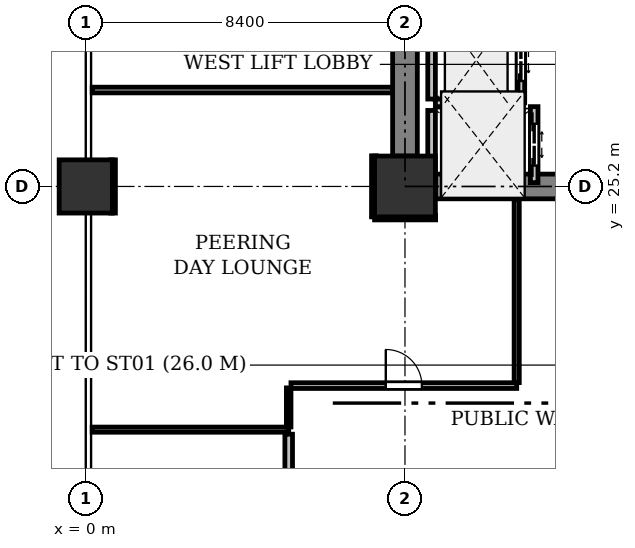
"""IFC4 building model, lengths in metres.
Left out: names, types, materials, properties, quantities, classifications, styles, units other than length and angle.
Written with IfcOpenShell. Run it as: python <this file> out.ifc"""

import sys

from ifc_helpers import new_model, si_unit, direction, frame, frame_2d, origin, origin_2d, place, context, subcontext, project, spatial, rectangle, extrude, element, fill, save


model = new_model("IFC4")
c1 = context("Model", 3, precision=1e-05, world=origin(), true_north=direction((0.0, 1.0)))
c2 = subcontext(c1, "Body", "Model", "MODEL_VIEW")
j1 = project(units=[si_unit("LENGTHUNIT", "METRE"), si_unit("PLANEANGLEUNIT", "RADIAN")], contexts=[c1])
p1 = place(None, origin())
s1 = spatial("IfcSite", under=j1, at=p1, CompositionType="ELEMENT")
p2 = place(p1, origin())
s2 = spatial("IfcBuilding", under=s1, at=p2, CompositionType="ELEMENT")
p3 = place(p2, frame((0.0, 0.0, 19.8)))
s3 = spatial("IfcBuildingStorey", under=s2, at=p3, CompositionType="ELEMENT", Elevation=19.8)
p4 = place(p3, frame((0.0, 25.2, 0.0), z_axis=(0.0, 0.0, 1.0), x_axis=(1.0, 0.0, 0.0)))
e1 = element("IfcColumn", 1, at=p4, inside=s3, PredefinedType="COLUMN", context=c2, shape_type="SweptSolid", body=[
    extrude(rectangle(XDim=1.4, YDim=1.4, at=origin_2d()), origin(), (0.0, 0.0, 1.0), 5.0),
])
p5 = place(p3, frame((8.4, 25.2, 0.0), z_axis=(0.0, 0.0, 1.0), x_axis=(1.0, 0.0, 0.0)))
e2 = element("IfcColumn", 2, at=p5, inside=s3, PredefinedType="COLUMN", context=c2, shape_type="SweptSolid", body=[
    extrude(rectangle(XDim=1.6, YDim=1.6, at=origin_2d()), origin(), (0.0, 0.0, 1.0), 5.0),
])
p6 = place(p3, frame((8.4, 26.0, 0.0), z_axis=(0.0, 0.0, 1.0), x_axis=(0.0, 1.0, 0.0)))
e3 = element("IfcWall", 3, at=p6, inside=s3, PredefinedType="SHEAR", context=c2, shape_type="SweptSolid", body=[
    extrude(rectangle(XDim=6.8, YDim=0.65, at=frame_2d((3.4, 0.0))), origin(), (0.0, 0.0, 1.0), 4.725),
])
p7 = place(p3, frame((9.2, 25.2, 0.0), z_axis=(0.0, 0.0, 1.0), x_axis=(1.0, 0.0, 0.0)))
e4 = element("IfcWall", 4, at=p7, inside=s3, PredefinedType="SHEAR", context=c2, shape_type="SweptSolid", body=[
    extrude(rectangle(XDim=6.8, YDim=0.65, at=frame_2d((3.4, 0.0))), origin(), (0.0, 0.0, 1.0), 4.725),
])
p8 = place(p7, frame((3.5, 0.0, 0.0)))
e5 = element("IfcOpeningElement", 5, at=p8, cuts=e4, PredefinedType="OPENING", context=c2, shape_type="SweptSolid", body=[
    extrude(rectangle(XDim=1.1, YDim=2.15, at=frame_2d((0.55, 1.075))), frame((0.0, 0.335, 0.0), z_axis=(0.0, -1.0, 0.0), x_axis=(1.0, 0.0, 0.0)), (0.0, 0.0, 1.0), 0.67),
])
p9 = place(p3, frame((11.45, 27.4, 0.0), z_axis=(0.0, 0.0, 1.0), x_axis=(0.0, 1.0, 0.0)))
e6 = element("IfcWall", 6, at=p9, inside=s3, PredefinedType="PARTITIONING", context=c2, shape_type="SweptSolid", body=[
    extrude(rectangle(XDim=2.25, YDim=0.2, at=frame_2d((1.125, 0.0))), origin(), (0.0, 0.0, 1.0), 4.725),
])
p10 = place(p9, frame((0.575, 0.0, 0.0)))
e7 = element("IfcOpeningElement", 7, at=p10, cuts=e6, PredefinedType="OPENING", context=c2, shape_type="SweptSolid", body=[
    extrude(rectangle(XDim=1.1, YDim=2.2, at=frame_2d((0.55, 1.1))), frame((0.0, 0.11, 0.0), z_axis=(0.0, -1.0, 0.0), x_axis=(1.0, 0.0, 0.0)), (0.0, 0.0, 1.0), 0.22),
])
p11 = place(p3, frame((9.1, 27.5, 0.0), z_axis=(0.0, 0.0, 1.0), x_axis=(0.0, 1.0, 0.0)))
e8 = element("IfcWall", 8, at=p11, inside=s3, PredefinedType="PARTITIONING", context=c2, shape_type="SweptSolid", body=[
    extrude(rectangle(XDim=2.05, YDim=0.2, at=frame_2d((1.025, 0.0))), origin(), (0.0, 0.0, 1.0), 4.725),
])
p12 = place(p3, frame((9.2, 27.4, 0.0), z_axis=(0.0, 0.0, 1.0), x_axis=(1.0, 0.0, 0.0)))
e9 = element("IfcWall", 9, at=p12, inside=s3, PredefinedType="PARTITIONING", context=c2, shape_type="SweptSolid", body=[
    extrude(rectangle(XDim=2.15, YDim=0.2, at=frame_2d((1.075, 0.0))), origin(), (0.0, 0.0, 1.0), 4.725),
])
p13 = place(p3, frame((11.8, 25.3, 0.0), z_axis=(0.0, 0.0, 1.0), x_axis=(0.0, 1.0, 0.0)))
e10 = element("IfcWall", 10, at=p13, inside=s3, PredefinedType="PARTITIONING", context=c2, shape_type="SweptSolid", body=[
    extrude(rectangle(XDim=2.0, YDim=0.2, at=frame_2d((1.0, 0.0))), origin(), (0.0, 0.0, 1.0), 4.725),
])
p14 = place(p13, frame((0.45, 0.0, 0.0)))
e11 = element("IfcOpeningElement", 11, at=p14, cuts=e10, PredefinedType="OPENING", context=c2, shape_type="SweptSolid", body=[
    extrude(rectangle(XDim=1.1, YDim=2.2, at=frame_2d((0.55, 1.1))), frame((0.0, 0.11, 0.0), z_axis=(0.0, -1.0, 0.0), x_axis=(1.0, 0.0, 0.0)), (0.0, 0.0, 1.0), 0.22),
])
p15 = place(p3, frame((9.1, 25.4, 0.0), z_axis=(0.0, 0.0, 1.0), x_axis=(0.0, 1.0, 0.0)))
e12 = element("IfcWall", 12, at=p15, inside=s3, PredefinedType="PARTITIONING", context=c2, shape_type="SweptSolid", body=[
    extrude(rectangle(XDim=1.8, YDim=0.2, at=frame_2d((0.9, 0.0))), origin(), (0.0, 0.0, 1.0), 4.725),
])
p16 = place(p3, frame((9.206, 24.381, 0.0), z_axis=(0.0, 0.0, 1.0), x_axis=(-0.999999815059, -0.000608179909, 0.0)))
e13 = element("IfcWall", 13, at=p16, inside=s3, PredefinedType="PARTITIONING", context=c2, shape_type="SweptSolid", body=[
    extrude(rectangle(XDim=1.606, YDim=0.12, at=frame_2d((0.803, 0.0))), origin(), (0.0, 0.0, 1.0), 4.113),
])
p17 = place(p3, frame((7.58, 24.4, 0.0), z_axis=(0.0, 0.0, 1.0), x_axis=(0.000456065626, 0.999999896002, 0.0)))
e14 = element("IfcWall", 14, at=p17, inside=s3, PredefinedType="PARTITIONING", context=c2, shape_type="SweptSolid", body=[
    extrude(rectangle(XDim=1.606, YDim=0.12, at=frame_2d((0.803, 0.0))), origin(), (0.0, 0.0, 1.0), 3.925),
])
p18 = place(p3, frame((8.071, 27.737, 0.0), z_axis=(0.0, 0.0, 1.0), x_axis=(-1.0, 0.0, 0.0)))
e15 = element("IfcWall", 15, at=p18, inside=s3, PredefinedType="PARTITIONING", context=c2, shape_type="SweptSolid", body=[
    extrude(rectangle(XDim=7.902, YDim=0.15, at=frame_2d((3.951, 0.0))), origin(), (0.0, 0.0, 1.0), 4.322),
])
p19 = place(p3, frame((0.72, 25.9, 0.0), z_axis=(0.0, 0.0, 1.0), x_axis=(0.0, -1.0, 0.0)))
e16 = element("IfcWall", 16, at=p19, inside=s3, PredefinedType="PARTITIONING", context=c2, shape_type="SweptSolid", body=[
    extrude(rectangle(XDim=1.4, YDim=0.12, at=frame_2d((0.7, 0.0))), origin(), (0.0, 0.0, 1.0), 3.925),
])
p20 = place(p3, frame((0.169, 18.801, 0.0), z_axis=(0.0, 0.0, 1.0), x_axis=(1.0, 0.0, 0.0)))
e17 = element("IfcWall", 17, at=p20, inside=s3, PredefinedType="PARTITIONING", context=c2, shape_type="SweptSolid", body=[
    extrude(rectangle(XDim=5.171, YDim=0.135, at=frame_2d((2.585, 0.0))), origin(), (0.0, 0.0, 1.0), 4.322),
])
p21 = place(p3, frame((5.34, 18.873, 0.0), z_axis=(0.0, 0.0, 1.0), x_axis=(0.0, 1.0, 0.0)))
e18 = element("IfcWall", 18, at=p21, inside=s3, PredefinedType="PARTITIONING", context=c2, shape_type="SweptSolid", body=[
    extrude(rectangle(XDim=1.027, YDim=0.12, at=frame_2d((0.514, 0.0))), origin(), (0.0, 0.0, 1.0), 4.725),
])
p22 = place(p3, frame((5.4, 19.96, 0.0), z_axis=(0.0, 0.0, 1.0), x_axis=(1.0, 0.0, 0.0)))
e19 = element("IfcWall", 19, at=p22, inside=s3, PredefinedType="PARTITIONING", context=c2, shape_type="SweptSolid", body=[
    extrude(rectangle(XDim=5.94, YDim=0.15, at=frame_2d((2.97, 0.0))), origin(), (0.0, 0.0, 1.0), 4.113),
])
p23 = place(p22, frame((2.495, 0.0, 0.0)))
e20 = element("IfcOpeningElement", 20, at=p23, cuts=e19, PredefinedType="OPENING", context=c2, shape_type="SweptSolid", body=[
    extrude(rectangle(XDim=0.95, YDim=2.15, at=frame_2d((0.475, 1.075))), frame((0.0, 0.085, 0.0), z_axis=(0.0, -1.0, 0.0), x_axis=(1.0, 0.0, 0.0)), (0.0, 0.0, 1.0), 0.17),
])
p24 = place(p3, frame((11.34, 20.039, 0.0), z_axis=(0.0, 0.0, 1.0), x_axis=(0.0, 1.0, 0.0)))
e21 = element("IfcWall", 21, at=p24, inside=s3, PredefinedType="PARTITIONING", context=c2, shape_type="SweptSolid", body=[
    extrude(rectangle(XDim=4.832, YDim=0.135, at=frame_2d((2.416, 0.0))), origin(), (0.0, 0.0, 1.0), 4.725),
])
p25 = place(p3, frame((5.34, 17.594, 0.0), z_axis=(0.0, 0.0, 1.0), x_axis=(-0.000224567702, 0.999999974785, 0.0)))
e22 = element("IfcWall", 22, at=p25, inside=s3, PredefinedType="PARTITIONING", context=c2, shape_type="SweptSolid", body=[
    extrude(rectangle(XDim=1.087, YDim=0.2, at=frame_2d((0.543, 0.0))), origin(), (0.0, 0.0, 1.0), 4.725),
])
p26 = place(p10, origin())
e23 = element("IfcDoor", 23, at=p26, inside=s3, OperationType="DOUBLE_DOOR_SLIDING", PredefinedType="DOOR", context=c2, shape_type="SweptSolid", body=[
    extrude(rectangle(XDim=1.1, YDim=2.2, at=frame_2d((0.55, 1.1))), frame((0.0, 0.025, 0.0), z_axis=(0.0, -1.0, 0.0), x_axis=(1.0, 0.0, 0.0)), (0.0, 0.0, 1.0), 0.05),
])
fill(e7, e23)
p27 = place(p14, origin())
e24 = element("IfcDoor", 24, at=p27, inside=s3, OperationType="DOUBLE_DOOR_SLIDING", PredefinedType="DOOR", context=c2, shape_type="SweptSolid", body=[
    extrude(rectangle(XDim=1.1, YDim=2.2, at=frame_2d((0.55, 1.1))), frame((0.0, 0.025, 0.0), z_axis=(0.0, -1.0, 0.0), x_axis=(1.0, 0.0, 0.0)), (0.0, 0.0, 1.0), 0.05),
])
fill(e11, e24)
p28 = place(p23, origin())
e25 = element("IfcDoor", 25, at=p28, inside=s3, OperationType="SINGLE_SWING_LEFT", PredefinedType="DOOR", context=c2, shape_type="SweptSolid", body=[
    extrude(rectangle(XDim=0.95, YDim=2.15, at=frame_2d((0.475, 1.075))), frame((0.0, 0.025, 0.0), z_axis=(0.0, -1.0, 0.0), x_axis=(1.0, 0.0, 0.0)), (0.0, 0.0, 1.0), 0.05),
])
fill(e20, e25)
save(model, sys.argv[1])
